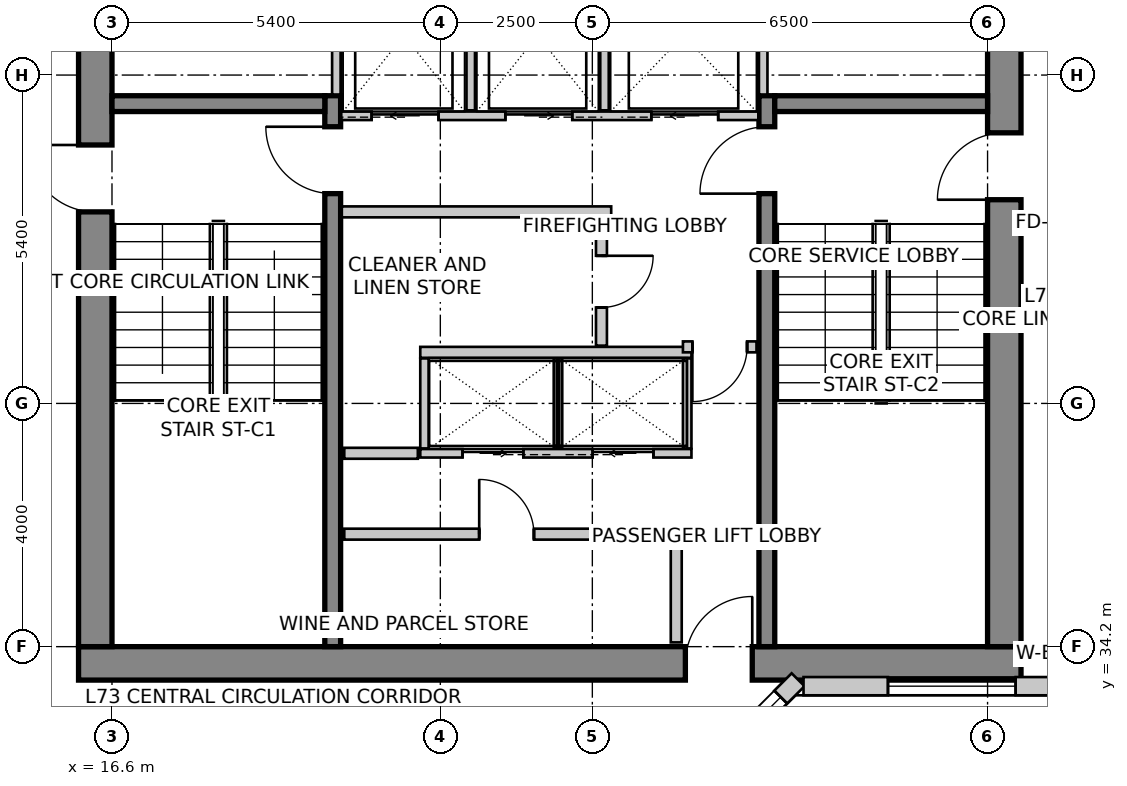
"""IFC4 building model, lengths in metres.
Left out: names, types, materials, properties, quantities, classifications, styles, units other than length and angle.
Written with IfcOpenShell. Run it as: python <this file> out.ifc"""

import sys

from ifc_helpers import new_model, si_unit, direction, frame, frame_2d, origin, place, context, subcontext, project, spatial, rectangle, extrude, source, transform, mapped, element, fill, save


model = new_model("IFC4")
c1 = context("Model", 3, precision=1e-05, world=origin(), true_north=direction((0.0, 1.0)))
c2 = subcontext(c1, "Body", "Model", "MODEL_VIEW")
j1 = project(units=[si_unit("LENGTHUNIT", "METRE"), si_unit("PLANEANGLEUNIT", "RADIAN")], contexts=[c1])
p1 = place(None, origin())
s1 = spatial("IfcSite", under=j1, at=p1, CompositionType="ELEMENT")
p2 = place(p1, origin())
s2 = spatial("IfcBuilding", under=s1, at=p2, CompositionType="ELEMENT")
p3 = place(p2, frame((0.0, 0.0, 285.3)))
s3 = spatial("IfcBuildingStorey", under=s2, at=p3, CompositionType="ELEMENT", Elevation=285.3)
p4 = place(p3, frame((16.05, 33.925, 0.0), z_axis=(0.0, 0.0, 1.0), x_axis=(1.0, 0.0, 0.0)))
e1 = element("IfcWall", 1, at=p4, inside=s3, PredefinedType="SHEAR", context=c2, shape_type="SweptSolid", body=[
    extrude(rectangle(XDim=15.5, YDim=0.55, at=frame_2d((7.75, 0.0))), origin(), (0.0, 0.0, 1.0), 3.6),
])
m1 = source(origin(), c2, "Body", "SweptSolid", [
    extrude(rectangle(XDim=1.1, YDim=2.15, at=frame_2d((0.55, 1.075))), frame((0.0, 0.285, 0.0), z_axis=(0.0, -1.0, 0.0), x_axis=(1.0, 0.0, 0.0)), (0.0, 0.0, 1.0), 0.57),
])
p5 = place(p4, frame((9.98, 0.0, 0.0)))
e2 = element("IfcOpeningElement", 2, at=p5, cuts=e1, PredefinedType="OPENING", context=c2, shape_type="MappedRepresentation", body=[
    mapped(m1, transform((0.0, 0.0, 0.0), scale=1.0)),
])
p6 = place(p3, frame((16.325, 34.2, 0.0), z_axis=(0.0, 0.0, 1.0), x_axis=(0.0, 1.0, 0.0)))
e3 = element("IfcWall", 3, at=p6, inside=s3, PredefinedType="SHEAR", context=c2, shape_type="SweptSolid", body=[
    extrude(rectangle(XDim=11.4, YDim=0.55, at=frame_2d((5.7, 0.0))), origin(), (0.0, 0.0, 1.0), 3.6),
])
p7 = place(p6, frame((7.15, 0.0, 0.0)))
e4 = element("IfcOpeningElement", 4, at=p7, cuts=e3, PredefinedType="OPENING", context=c2, shape_type="MappedRepresentation", body=[
    mapped(m1, transform((0.0, 0.0, 0.0), scale=1.0)),
])
p8 = place(p3, frame((31.275, 34.2, 0.0), z_axis=(0.0, 0.0, 1.0), x_axis=(0.0, 1.0, 0.0)))
e5 = element("IfcWall", 5, at=p8, inside=s3, PredefinedType="SHEAR", context=c2, shape_type="SweptSolid", body=[
    extrude(rectangle(XDim=11.4, YDim=0.55, at=frame_2d((5.7, 0.0))), origin(), (0.0, 0.0, 1.0), 3.6),
])
p9 = place(p8, frame((7.35, 0.0, 0.0)))
e6 = element("IfcOpeningElement", 6, at=p9, cuts=e5, PredefinedType="OPENING", context=c2, shape_type="MappedRepresentation", body=[
    mapped(m1, transform((0.0, 0.0, 0.0), scale=1.0)),
])
p10 = place(p3, frame((20.23, 34.2, 0.0), z_axis=(0.0, 0.0, 1.0), x_axis=(0.0, 1.0, 0.0)))
e7 = element("IfcWall", 7, at=p10, inside=s3, PredefinedType="SHEAR", context=c2, shape_type="SweptSolid", body=[
    extrude(rectangle(XDim=9.06, YDim=0.26, at=frame_2d((4.53, 0.0))), origin(), (0.0, 0.0, 1.0), 3.6),
])
m2 = source(origin(), c2, "Body", "SweptSolid", [
    extrude(rectangle(XDim=1.1, YDim=2.15, at=frame_2d((0.55, 1.075))), frame((0.0, 0.14, 0.0), z_axis=(0.0, -1.0, 0.0), x_axis=(1.0, 0.0, 0.0)), (0.0, 0.0, 1.0), 0.28),
])
p11 = place(p10, frame((7.45, 0.0, 0.0)))
e8 = element("IfcOpeningElement", 8, at=p11, cuts=e7, PredefinedType="OPENING", context=c2, shape_type="MappedRepresentation", body=[
    mapped(m2, transform((0.0, 0.0, 0.0), scale=1.0)),
])
p12 = place(p3, frame((27.37, 34.2, 0.0), z_axis=(0.0, 0.0, 1.0), x_axis=(0.0, 1.0, 0.0)))
e9 = element("IfcWall", 9, at=p12, inside=s3, PredefinedType="SHEAR", context=c2, shape_type="SweptSolid", body=[
    extrude(rectangle(XDim=9.06, YDim=0.26, at=frame_2d((4.53, 0.0))), origin(), (0.0, 0.0, 1.0), 3.6),
])
p13 = place(p12, frame((7.45, 0.0, 0.0)))
e10 = element("IfcOpeningElement", 10, at=p13, cuts=e9, PredefinedType="OPENING", context=c2, shape_type="MappedRepresentation", body=[
    mapped(m2, transform((0.0, 0.0, 0.0), scale=1.0)),
])
for number, where, z_axis, x_axis in (
    (11, (16.6, 43.13, 0.0), (0.0, 0.0, 1.0), (1.0, 0.0, 0.0)),
    (12, (27.5, 43.13, 0.0), (0.0, 0.0, 1.0), (1.0, 0.0, 0.0)),
):
    element("IfcWall", number, at=place(p3, frame(where, z_axis=z_axis, x_axis=x_axis)), inside=s3, PredefinedType="SHEAR", context=c2, shape_type="SweptSolid", body=[
        extrude(rectangle(XDim=3.5, YDim=0.26, at=frame_2d((1.75, 0.0))), origin(), (0.0, 0.0, 1.0), 3.6),
    ])
p14 = place(p3, frame((25.828, 31.6, 0.0), z_axis=(0.0, 0.0, 1.0), x_axis=(0.707106781187, 0.707106781187, 0.0)))
e13 = element("IfcWall", 13, at=p14, inside=s3, PredefinedType="SOLIDWALL", context=c2, shape_type="SweptSolid", body=[
    extrude(rectangle(XDim=2.907, YDim=0.3, at=frame_2d((1.454, 0.0))), origin(), (0.0, 0.0, 1.0), 3.35),
])
m3 = source(origin(), c2, "Body", "SweptSolid", [
    extrude(rectangle(XDim=2.1, YDim=2.0, at=frame_2d((1.05, 1.0))), frame((0.0, 0.16, 0.0), z_axis=(0.0, -1.0, 0.0), x_axis=(1.0, 0.0, 0.0)), (0.0, 0.0, 1.0), 0.32),
])
p15 = place(p14, frame((0.404, 0.0, 0.85)))
e14 = element("IfcOpeningElement", 14, at=p15, cuts=e13, PredefinedType="OPENING", context=c2, shape_type="MappedRepresentation", body=[
    mapped(m3, transform((0.0, 0.0, 0.0), scale=1.0)),
])
p16 = place(p3, frame((27.973, 33.55, 0.0), z_axis=(0.0, 0.0, 1.0), x_axis=(1.0, 0.0, 0.0)))
e15 = element("IfcWall", 15, at=p16, inside=s3, PredefinedType="SOLIDWALL", context=c2, shape_type="SweptSolid", body=[
    extrude(rectangle(XDim=9.115, YDim=0.3, at=frame_2d((4.558, 0.0))), origin(), (0.0, 0.0, 1.0), 3.35),
])
p17 = place(p16, frame((1.389, 0.0, 0.85)))
e16 = element("IfcOpeningElement", 16, at=p17, cuts=e15, PredefinedType="OPENING", context=c2, shape_type="MappedRepresentation", body=[
    mapped(m3, transform((0.0, 0.0, 0.0), scale=1.0)),
])
m4 = source(origin(), c2, "Body", "SweptSolid", [
    extrude(rectangle(XDim=2.4, YDim=2.2, at=frame_2d((1.2, 1.1))), frame((0.0, 0.16, 0.0), z_axis=(0.0, -1.0, 0.0), x_axis=(1.0, 0.0, 0.0)), (0.0, 0.0, 1.0), 0.32),
])
p18 = place(p16, frame((5.476, 0.0, 0.85)))
e17 = element("IfcOpeningElement", 17, at=p18, cuts=e15, PredefinedType="OPENING", context=c2, shape_type="MappedRepresentation", body=[
    mapped(m4, transform((0.0, 0.0, 0.0), scale=1.0)),
])
p19 = place(p3, frame((20.37, 42.93, 0.0), z_axis=(0.0, 0.0, 1.0), x_axis=(1.0, 0.0, 0.0)))
e18 = element("IfcWall", 18, at=p19, inside=s3, PredefinedType="SOLIDWALL", context=c2, shape_type="SweptSolid", body=[
    extrude(rectangle(XDim=6.86, YDim=0.14, at=frame_2d((3.43, 0.0))), origin(), (0.0, 0.0, 1.0), 3.35),
])
m5 = source(origin(), c2, "Body", "SweptSolid", [
    extrude(rectangle(XDim=1.1, YDim=2.15, at=frame_2d((0.55, 1.075))), frame((0.0, 0.08, 0.0), z_axis=(0.0, -1.0, 0.0), x_axis=(1.0, 0.0, 0.0)), (0.0, 0.0, 1.0), 0.16),
])
p20 = place(p19, frame((0.5, 0.0, 0.0)))
e19 = element("IfcOpeningElement", 19, at=p20, cuts=e18, PredefinedType="OPENING", context=c2, shape_type="MappedRepresentation", body=[
    mapped(m5, transform((0.0, 0.0, 0.0), scale=1.0)),
])
p21 = place(p19, frame((2.7, 0.0, 0.0)))
e20 = element("IfcOpeningElement", 20, at=p21, cuts=e18, PredefinedType="OPENING", context=c2, shape_type="MappedRepresentation", body=[
    mapped(m5, transform((0.0, 0.0, 0.0), scale=1.0)),
])
p22 = place(p19, frame((5.1, 0.0, 0.0)))
e21 = element("IfcOpeningElement", 21, at=p22, cuts=e18, PredefinedType="OPENING", context=c2, shape_type="MappedRepresentation", body=[
    mapped(m5, transform((0.0, 0.0, 0.0), scale=1.0)),
])
for number, where, z_axis, x_axis in (
    (22, (20.29, 43.28, 0.0), (0.0, 0.0, 1.0), (0.0, 1.0, 0.0)),
    (23, (27.31, 43.28, 0.0), (0.0, 0.0, 1.0), (0.0, 1.0, 0.0)),
):
    element("IfcWall", number, at=place(p3, frame(where, z_axis=z_axis, x_axis=x_axis)), inside=s3, PredefinedType="SOLIDWALL", context=c2, shape_type="SweptSolid", body=[
        extrude(rectangle(XDim=2.3, YDim=0.14, at=frame_2d((1.15, 0.0))), origin(), (0.0, 0.0, 1.0), 3.35),
    ])
for number, where, z_axis, x_axis in (
    (24, (22.5, 43.02, 0.0), (0.0, 0.0, 1.0), (0.0, 1.0, 0.0)),
    (25, (24.7, 43.02, 0.0), (0.0, 0.0, 1.0), (0.0, 1.0, 0.0)),
):
    element("IfcWall", number, at=place(p3, frame(where, z_axis=z_axis, x_axis=x_axis)), inside=s3, PredefinedType="SOLIDWALL", context=c2, shape_type="SweptSolid", body=[
        extrude(rectangle(XDim=2.56, YDim=0.14, at=frame_2d((1.28, 0.0))), origin(), (0.0, 0.0, 1.0), 3.35),
    ])
p23 = place(p3, frame((21.67, 37.38, 0.0), z_axis=(0.0, 0.0, 1.0), x_axis=(1.0, 0.0, 0.0)))
e26 = element("IfcWall", 26, at=p23, inside=s3, PredefinedType="SOLIDWALL", context=c2, shape_type="SweptSolid", body=[
    extrude(rectangle(XDim=4.46, YDim=0.14, at=frame_2d((2.23, 0.0))), origin(), (0.0, 0.0, 1.0), 3.35),
])
m6 = source(origin(), c2, "Body", "SweptSolid", [
    extrude(rectangle(XDim=1.0, YDim=2.15, at=frame_2d((0.5, 1.075))), frame((0.0, 0.08, 0.0), z_axis=(0.0, -1.0, 0.0), x_axis=(1.0, 0.0, 0.0)), (0.0, 0.0, 1.0), 0.16),
])
p24 = place(p23, frame((0.695, 0.0, 0.0)))
e27 = element("IfcOpeningElement", 27, at=p24, cuts=e26, PredefinedType="OPENING", context=c2, shape_type="MappedRepresentation", body=[
    mapped(m6, transform((0.0, 0.0, 0.0), scale=1.0)),
])
p25 = place(p23, frame((2.835, 0.0, 0.0)))
e28 = element("IfcOpeningElement", 28, at=p25, cuts=e26, PredefinedType="OPENING", context=c2, shape_type="MappedRepresentation", body=[
    mapped(m6, transform((0.0, 0.0, 0.0), scale=1.0)),
])
p26 = place(p3, frame((21.67, 39.04, 0.0), z_axis=(0.0, 0.0, 1.0), x_axis=(1.0, 0.0, 0.0)))
e29 = element("IfcWall", 29, at=p26, inside=s3, PredefinedType="SOLIDWALL", context=c2, shape_type="SweptSolid", body=[
    extrude(rectangle(XDim=4.46, YDim=0.18, at=frame_2d((2.23, 0.0))), origin(), (0.0, 0.0, 1.0), 3.35),
])
for number, where, z_axis, x_axis in (
    (30, (26.06, 37.46, 0.0), (0.0, 0.0, 1.0), (0.0, 1.0, 0.0)),
    (31, (21.74, 37.46, 0.0), (0.0, 0.0, 1.0), (0.0, 1.0, 0.0)),
    (32, (23.935, 37.46, 0.0), (0.0, 0.0, 1.0), (0.0, 1.0, 0.0)),
):
    element("IfcWall", number, at=place(p3, frame(where, z_axis=z_axis, x_axis=x_axis)), inside=s3, PredefinedType="SOLIDWALL", context=c2, shape_type="SweptSolid", body=[
        extrude(rectangle(XDim=1.48, YDim=0.14, at=frame_2d((0.74, 0.0))), origin(), (0.0, 0.0, 1.0), 3.35),
    ])
p27 = place(p3, frame((24.81, 41.35, 0.0), z_axis=(0.0, 0.0, 1.0), x_axis=(-1.0, 0.0, 0.0)))
e33 = element("IfcWall", 33, at=p27, inside=s3, PredefinedType="PARTITIONING", context=c2, shape_type="SweptSolid", body=[
    extrude(rectangle(XDim=4.43, YDim=0.18, at=frame_2d((2.215, 0.0))), origin(), (0.0, 0.0, 1.0), 3.35),
])
p28 = place(p3, frame((24.65, 41.256, 0.0), z_axis=(0.0, 0.0, 1.0), x_axis=(0.0, -1.0, 0.0)))
e34 = element("IfcWall", 34, at=p28, inside=s3, PredefinedType="PARTITIONING", context=c2, shape_type="SweptSolid", body=[
    extrude(rectangle(XDim=2.106, YDim=0.18, at=frame_2d((1.053, 0.0))), origin(), (0.0, 0.0, 1.0), 3.35),
])
m7 = source(origin(), c2, "Body", "SweptSolid", [
    extrude(rectangle(XDim=0.85, YDim=2.15, at=frame_2d((0.425, 1.075))), frame((0.0, 0.1, 0.0), z_axis=(0.0, -1.0, 0.0), x_axis=(1.0, 0.0, 0.0)), (0.0, 0.0, 1.0), 0.2),
])
p29 = place(p28, frame((0.628, 0.0, 0.0)))
e35 = element("IfcOpeningElement", 35, at=p29, cuts=e34, PredefinedType="OPENING", context=c2, shape_type="MappedRepresentation", body=[
    mapped(m7, transform((0.0, 0.0, 0.0), scale=1.0)),
])
p30 = place(p3, frame((21.63, 37.38, 0.0), z_axis=(0.0, 0.0, 1.0), x_axis=(-1.0, 0.0, 0.0)))
e36 = element("IfcWall", 36, at=p30, inside=s3, PredefinedType="PARTITIONING", context=c2, shape_type="SweptSolid", body=[
    extrude(rectangle(XDim=1.21, YDim=0.18, at=frame_2d((0.605, 0.0))), origin(), (0.0, 0.0, 1.0), 3.35),
])
p31 = place(p3, frame((27.2, 39.13, 0.0), z_axis=(0.0, 0.0, 1.0), x_axis=(-1.0, 0.0, 0.0)))
e37 = element("IfcWall", 37, at=p31, inside=s3, PredefinedType="PARTITIONING", context=c2, shape_type="SweptSolid", body=[
    extrude(rectangle(XDim=1.21, YDim=0.18, at=frame_2d((0.605, 0.0))), origin(), (0.0, 0.0, 1.0), 3.35),
])
m8 = source(origin(), c2, "Body", "SweptSolid", [
    extrude(rectangle(XDim=0.9, YDim=2.15, at=frame_2d((0.45, 1.075))), frame((0.0, 0.1, 0.0), z_axis=(0.0, -1.0, 0.0), x_axis=(1.0, 0.0, 0.0)), (0.0, 0.0, 1.0), 0.2),
])
p32 = place(p31, frame((0.155, 0.0, 0.0)))
e38 = element("IfcOpeningElement", 38, at=p32, cuts=e37, PredefinedType="OPENING", context=c2, shape_type="MappedRepresentation", body=[
    mapped(m8, transform((0.0, 0.0, 0.0), scale=1.0)),
])
p33 = place(p3, frame((20.42, 36.05, 0.0), z_axis=(0.0, 0.0, 1.0), x_axis=(1.0, 0.0, 0.0)))
e39 = element("IfcWall", 39, at=p33, inside=s3, PredefinedType="PARTITIONING", context=c2, shape_type="SweptSolid", body=[
    extrude(rectangle(XDim=5.46, YDim=0.18, at=frame_2d((2.73, 0.0))), origin(), (0.0, 0.0, 1.0), 3.35),
])
p34 = place(p33, frame((2.219, 0.0, 0.0)))
e40 = element("IfcOpeningElement", 40, at=p34, cuts=e39, PredefinedType="OPENING", context=c2, shape_type="MappedRepresentation", body=[
    mapped(m8, transform((0.0, 0.0, 0.0), scale=1.0)),
])
p35 = place(p3, frame((25.88, 35.956, 0.0), z_axis=(0.0, 0.0, 1.0), x_axis=(0.0, -1.0, 0.0)))
e41 = element("IfcWall", 41, at=p35, inside=s3, PredefinedType="PARTITIONING", context=c2, shape_type="SweptSolid", body=[
    extrude(rectangle(XDim=1.686, YDim=0.18, at=frame_2d((0.843, 0.0))), origin(), (0.0, 0.0, 1.0), 2.642),
])
m9 = source(origin(), c2, "Body", "SweptSolid", [
    extrude(rectangle(XDim=2.1, YDim=2.0, at=frame_2d((1.05, 1.0))), frame((0.0, -0.015, 0.0), z_axis=(0.0, -1.0, 0.0), x_axis=(1.0, 0.0, 0.0)), (0.0, 0.0, 1.0), 0.06),
])
p36 = place(p15, origin())
e42 = element("IfcWindow", 42, at=p36, inside=s3, PartitioningType="SINGLE_PANEL", PredefinedType="WINDOW", context=c2, shape_type="MappedRepresentation", body=[
    mapped(m9, transform((0.0, 0.0, 0.0), scale=1.0)),
])
fill(e14, e42)
p37 = place(p17, origin())
e43 = element("IfcWindow", 43, at=p37, inside=s3, PartitioningType="SINGLE_PANEL", PredefinedType="WINDOW", context=c2, shape_type="MappedRepresentation", body=[
    mapped(m9, transform((0.0, 0.0, 0.0), scale=1.0)),
])
fill(e16, e43)
m10 = source(origin(), c2, "Body", "SweptSolid", [
    extrude(rectangle(XDim=1.1, YDim=2.15, at=frame_2d((0.55, 1.075))), frame((0.0, 0.025, 0.0), z_axis=(0.0, -1.0, 0.0), x_axis=(1.0, 0.0, 0.0)), (0.0, 0.0, 1.0), 0.05),
])
p38 = place(p20, origin())
e44 = element("IfcDoor", 44, at=p38, inside=s3, OperationType="SLIDING_TO_LEFT", PredefinedType="DOOR", context=c2, shape_type="MappedRepresentation", body=[
    mapped(m10, transform((0.0, 0.0, 0.0), scale=1.0)),
])
fill(e19, e44)
p39 = place(p21, origin())
e45 = element("IfcDoor", 45, at=p39, inside=s3, OperationType="SLIDING_TO_RIGHT", PredefinedType="DOOR", context=c2, shape_type="MappedRepresentation", body=[
    mapped(m10, transform((0.0, 0.0, 0.0), scale=1.0)),
])
fill(e20, e45)
m11 = source(origin(), c2, "Body", "SweptSolid", [
    extrude(rectangle(XDim=1.1, YDim=2.15, at=frame_2d((0.55, 1.075))), frame((0.0, 0.025, 0.0), z_axis=(0.0, -1.0, 0.0), x_axis=(1.0, 0.0, 0.0)), (0.0, 0.0, 1.0), 0.05),
])
p40 = place(p22, origin())
e46 = element("IfcDoor", 46, at=p40, inside=s3, OperationType="SLIDING_TO_LEFT", PredefinedType="DOOR", context=c2, shape_type="MappedRepresentation", body=[
    mapped(m11, transform((0.0, 0.0, 0.0), scale=1.0)),
])
fill(e21, e46)
m12 = source(origin(), c2, "Body", "SweptSolid", [
    extrude(rectangle(XDim=1.0, YDim=2.15, at=frame_2d((0.5, 1.075))), frame((0.0, 0.025, 0.0), z_axis=(0.0, -1.0, 0.0), x_axis=(1.0, 0.0, 0.0)), (0.0, 0.0, 1.0), 0.05),
])
p41 = place(p24, origin())
e47 = element("IfcDoor", 47, at=p41, inside=s3, OperationType="SLIDING_TO_RIGHT", PredefinedType="DOOR", context=c2, shape_type="MappedRepresentation", body=[
    mapped(m12, transform((0.0, 0.0, 0.0), scale=1.0)),
])
fill(e27, e47)
p42 = place(p25, origin())
e48 = element("IfcDoor", 48, at=p42, inside=s3, OperationType="SLIDING_TO_LEFT", PredefinedType="DOOR", context=c2, shape_type="MappedRepresentation", body=[
    mapped(m12, transform((0.0, 0.0, 0.0), scale=1.0)),
])
fill(e28, e48)
m13 = source(origin(), c2, "Body", "SweptSolid", [
    extrude(rectangle(XDim=1.1, YDim=2.15, at=frame_2d((0.55, 1.075))), frame((0.0, 0.025, 0.0), z_axis=(0.0, -1.0, 0.0), x_axis=(1.0, 0.0, 0.0)), (0.0, 0.0, 1.0), 0.05),
])
p43 = place(p11, origin())
e49 = element("IfcDoor", 49, at=p43, inside=s3, OperationType="SINGLE_SWING_RIGHT", PredefinedType="DOOR", context=c2, shape_type="MappedRepresentation", body=[
    mapped(m13, transform((0.0, 0.0, 0.0), scale=1.0)),
])
fill(e8, e49)
p44 = place(p13, origin())
e50 = element("IfcDoor", 50, at=p44, inside=s3, OperationType="SINGLE_SWING_LEFT", PredefinedType="DOOR", context=c2, shape_type="MappedRepresentation", body=[
    mapped(m13, transform((0.0, 0.0, 0.0), scale=1.0)),
])
fill(e10, e50)
p45 = place(p7, origin())
e51 = element("IfcDoor", 51, at=p45, inside=s3, OperationType="SINGLE_SWING_RIGHT", PredefinedType="DOOR", context=c2, shape_type="MappedRepresentation", body=[
    mapped(m13, transform((0.0, 0.0, 0.0), scale=1.0)),
])
fill(e4, e51)
p46 = place(p9, origin())
e52 = element("IfcDoor", 52, at=p46, inside=s3, OperationType="SINGLE_SWING_LEFT", PredefinedType="DOOR", context=c2, shape_type="MappedRepresentation", body=[
    mapped(m13, transform((0.0, 0.0, 0.0), scale=1.0)),
])
fill(e6, e52)
p47 = place(p5, origin())
e53 = element("IfcDoor", 53, at=p47, inside=s3, OperationType="SINGLE_SWING_RIGHT", PredefinedType="DOOR", context=c2, shape_type="MappedRepresentation", body=[
    mapped(m13, transform((0.0, 0.0, 0.0), scale=1.0)),
])
fill(e2, e53)
m14 = source(origin(), c2, "Body", "SweptSolid", [
    extrude(rectangle(XDim=0.85, YDim=2.15, at=frame_2d((0.425, 1.075))), frame((0.0, 0.025, 0.0), z_axis=(0.0, -1.0, 0.0), x_axis=(1.0, 0.0, 0.0)), (0.0, 0.0, 1.0), 0.05),
])
p48 = place(p29, origin())
e54 = element("IfcDoor", 54, at=p48, inside=s3, OperationType="SINGLE_SWING_LEFT", PredefinedType="DOOR", context=c2, shape_type="MappedRepresentation", body=[
    mapped(m14, transform((0.0, 0.0, 0.0), scale=1.0)),
])
fill(e35, e54)
m15 = source(origin(), c2, "Body", "SweptSolid", [
    extrude(rectangle(XDim=0.9, YDim=2.15, at=frame_2d((0.45, 1.075))), frame((0.0, 0.025, 0.0), z_axis=(0.0, -1.0, 0.0), x_axis=(1.0, 0.0, 0.0)), (0.0, 0.0, 1.0), 0.05),
])
p49 = place(p32, origin())
e55 = element("IfcDoor", 55, at=p49, inside=s3, OperationType="SINGLE_SWING_RIGHT", PredefinedType="DOOR", context=c2, shape_type="MappedRepresentation", body=[
    mapped(m15, transform((0.0, 0.0, 0.0), scale=1.0)),
])
fill(e38, e55)
p50 = place(p34, origin())
e56 = element("IfcDoor", 56, at=p50, inside=s3, OperationType="SINGLE_SWING_LEFT", PredefinedType="DOOR", context=c2, shape_type="MappedRepresentation", body=[
    mapped(m15, transform((0.0, 0.0, 0.0), scale=1.0)),
])
fill(e40, e56)
save(model, sys.argv[1])
